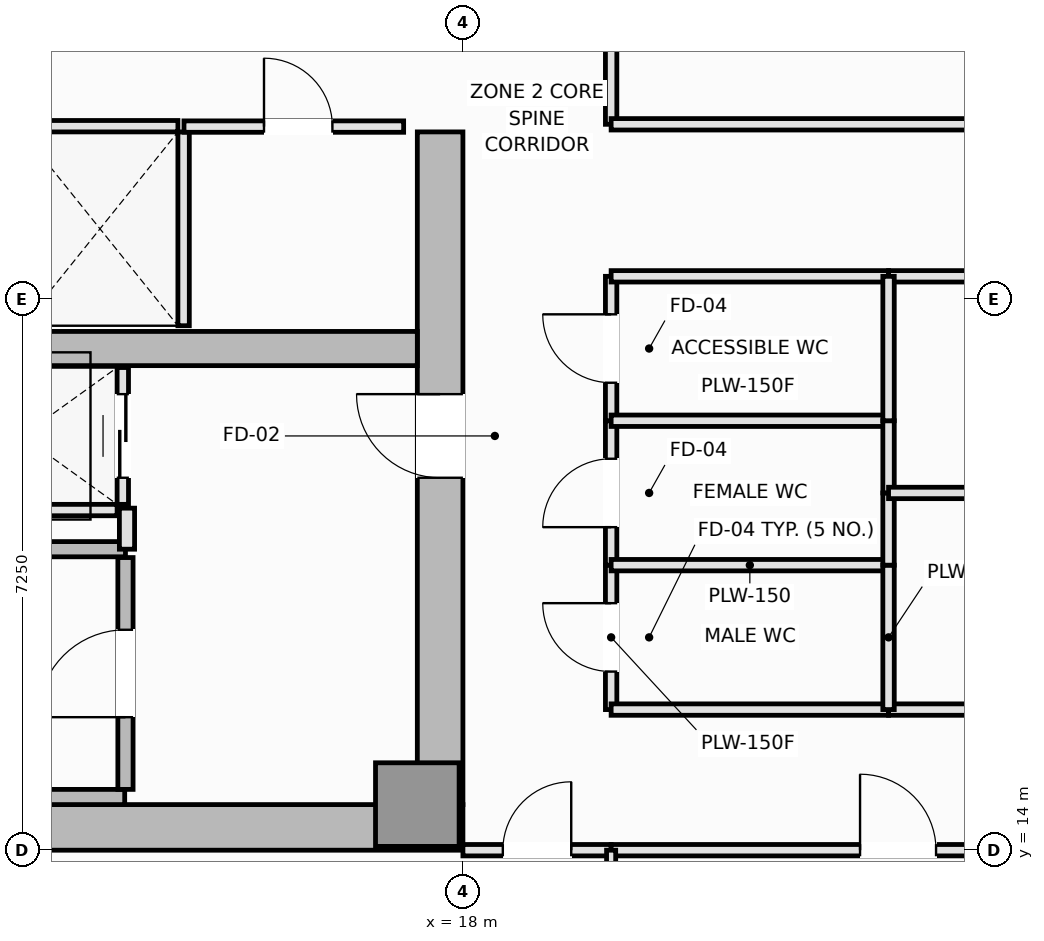
"""IFC4 building model, lengths in metres.
Left out: names, types, materials, properties, quantities, classifications, styles, units other than length and angle.
Written with IfcOpenShell. Run it as: python <this file> out.ifc"""

import sys

from ifc_helpers import new_model, si_unit, direction, frame, frame_2d, origin, origin_2d, place, context, subcontext, project, spatial, rectangle, extrude, element, fill, save


model = new_model("IFC4")
c1 = context("Model", 3, precision=1e-05, world=origin(), true_north=direction((0.0, 1.0)))
c2 = subcontext(c1, "Body", "Model", "MODEL_VIEW")
j1 = project(units=[si_unit("LENGTHUNIT", "METRE"), si_unit("PLANEANGLEUNIT", "RADIAN")], contexts=[c1])
p1 = place(None, origin())
s1 = spatial("IfcSite", under=j1, at=p1, CompositionType="ELEMENT")
p2 = place(p1, origin())
s2 = spatial("IfcBuilding", under=s1, at=p2, CompositionType="ELEMENT")
p3 = place(p2, frame((0.0, 0.0, 127.1)))
s3 = spatial("IfcBuildingStorey", under=s2, at=p3, CompositionType="ELEMENT", Elevation=127.1)
p4 = place(p3, frame((4.5, 14.3, 0.0), z_axis=(0.0, 0.0, 1.0), x_axis=(1.0, 0.0, 0.0)))
e1 = element("IfcWall", 1, at=p4, inside=s3, PredefinedType="SHEAR", context=c2, shape_type="SweptSolid", body=[
    extrude(rectangle(XDim=13.5, YDim=0.6, at=frame_2d((6.75, 0.0))), origin(), (0.0, 0.0, 1.0), 3.55),
])
p5 = place(p3, frame((17.7, 14.6, 0.0), z_axis=(0.0, 0.0, 1.0), x_axis=(0.0, 1.0, 0.0)))
e2 = element("IfcWall", 2, at=p5, inside=s3, PredefinedType="SHEAR", context=c2, shape_type="SweptSolid", body=[
    extrude(rectangle(XDim=8.85, YDim=0.6, at=frame_2d((4.425, 0.0))), origin(), (0.0, 0.0, 1.0), 3.55),
])
p6 = place(p5, frame((4.3, 0.0, 0.0)))
e3 = element("IfcOpeningElement", 3, at=p6, cuts=e2, PredefinedType="OPENING", context=c2, shape_type="SweptSolid", body=[
    extrude(rectangle(XDim=1.1, YDim=2.15, at=frame_2d((0.55, 1.075))), frame((0.0, 0.31, 0.0), z_axis=(0.0, -1.0, 0.0), x_axis=(1.0, 0.0, 0.0)), (0.0, 0.0, 1.0), 0.62),
])
p7 = place(p3, frame((5.1, 20.6, 0.0), z_axis=(0.0, 0.0, 1.0), x_axis=(1.0, 0.0, 0.0)))
e4 = element("IfcWall", 4, at=p7, inside=s3, PredefinedType="SHEAR", context=c2, shape_type="SweptSolid", body=[
    extrude(rectangle(XDim=12.3, YDim=0.45, at=frame_2d((6.15, 0.0))), origin(), (0.0, 0.0, 1.0), 3.55),
])
p8 = place(p3, frame((17.4, 14.6, 0.0), z_axis=(0.0, 0.0, 1.0), x_axis=(1.0, 0.0, 0.0)))
e5 = element("IfcColumn", 5, at=p8, inside=s3, PredefinedType="PILASTER", context=c2, shape_type="SweptSolid", body=[
    extrude(rectangle(XDim=1.1, YDim=1.1, at=origin_2d()), origin(), (0.0, 0.0, 1.0), 3.55),
])
p9 = place(p3, frame((5.8, 14.7, 0.0), z_axis=(0.0, 0.0, 1.0), x_axis=(1.0, 0.0, 0.0)))
e6 = element("IfcWall", 6, at=p9, inside=s3, PredefinedType="SOLIDWALL", context=c2, shape_type="SweptSolid", body=[
    extrude(rectangle(XDim=7.75, YDim=0.2, at=frame_2d((3.875, 0.0))), origin(), (0.0, 0.0, 1.0), 3.55),
])
p10 = place(p3, frame((5.9, 17.96, 0.0), z_axis=(0.0, 0.0, 1.0), x_axis=(1.0, 0.0, 0.0)))
e7 = element("IfcWall", 7, at=p10, inside=s3, PredefinedType="SOLIDWALL", context=c2, shape_type="SweptSolid", body=[
    extrude(rectangle(XDim=7.66, YDim=0.2, at=frame_2d((3.83, 0.0))), origin(), (0.0, 0.0, 1.0), 3.55),
])
p11 = place(p3, frame((13.56, 14.8, 0.0), z_axis=(0.0, 0.0, 1.0), x_axis=(0.0, 1.0, 0.0)))
e8 = element("IfcWall", 8, at=p11, inside=s3, PredefinedType="SOLIDWALL", context=c2, shape_type="SweptSolid", body=[
    extrude(rectangle(XDim=3.05, YDim=0.2, at=frame_2d((1.525, 0.0))), origin(), (0.0, 0.0, 1.0), 3.55),
])
p12 = place(p11, frame((0.95, 0.0, 0.0)))
e9 = element("IfcOpeningElement", 9, at=p12, cuts=e8, PredefinedType="OPENING", context=c2, shape_type="SweptSolid", body=[
    extrude(rectangle(XDim=1.15, YDim=2.15, at=frame_2d((0.575, 1.075))), frame((0.0, 0.11, 0.0), z_axis=(0.0, -1.0, 0.0), x_axis=(1.0, 0.0, 0.0)), (0.0, 0.0, 1.0), 0.22),
])
p13 = place(p3, frame((12.2, 23.525, 0.0), z_axis=(0.0, 0.0, 1.0), x_axis=(1.0, 0.0, 0.0)))
e10 = element("IfcWall", 10, at=p13, inside=s3, PredefinedType="PARTITIONING", context=c2, shape_type="SweptSolid", body=[
    extrude(rectangle(XDim=2.05, YDim=0.15, at=frame_2d((1.025, 0.0))), origin(), (0.0, 0.0, 1.0), 3.37),
])
p14 = place(p3, frame((14.325, 20.9, 0.0), z_axis=(0.0, 0.0, 1.0), x_axis=(0.0, 1.0, 0.0)))
e11 = element("IfcWall", 11, at=p14, inside=s3, PredefinedType="PARTITIONING", context=c2, shape_type="SweptSolid", body=[
    extrude(rectangle(XDim=2.55, YDim=0.15, at=frame_2d((1.275, 0.0))), origin(), (0.0, 0.0, 1.0), 3.37),
])
p15 = place(p3, frame((10.95, 18.475, 0.0), z_axis=(0.0, 0.0, 1.0), x_axis=(1.0, 0.0, 0.0)))
e12 = element("IfcWall", 12, at=p15, inside=s3, PredefinedType="PARTITIONING", context=c2, shape_type="SweptSolid", body=[
    extrude(rectangle(XDim=2.5, YDim=0.15, at=frame_2d((1.25, 0.0))), origin(), (0.0, 0.0, 1.0), 3.37),
])
p16 = place(p3, frame((13.525, 18.55, 0.0), z_axis=(0.0, 0.0, 1.0), x_axis=(0.0, 1.0, 0.0)))
e13 = element("IfcWall", 13, at=p16, inside=s3, PredefinedType="PARTITIONING", context=c2, shape_type="SweptSolid", body=[
    extrude(rectangle(XDim=1.8, YDim=0.15, at=frame_2d((0.9, 0.0))), origin(), (0.0, 0.0, 1.0), 3.37),
])
p17 = place(p16, frame((0.35, 0.0, 0.0)))
e14 = element("IfcOpeningElement", 14, at=p17, cuts=e13, PredefinedType="OPENING", context=c2, shape_type="SweptSolid", body=[
    extrude(rectangle(XDim=1.1, YDim=2.2, at=frame_2d((0.55, 1.1))), frame((0.0, 0.085, 0.0), z_axis=(0.0, -1.0, 0.0), x_axis=(1.0, 0.0, 0.0)), (0.0, 0.0, 1.0), 0.17),
])
p18 = place(p3, frame((13.58, 17.96, 0.0), z_axis=(0.0, 0.0, 1.0), x_axis=(0.0, 1.0, 0.0)))
e15 = element("IfcWall", 15, at=p18, inside=s3, PredefinedType="PARTITIONING", context=c2, shape_type="SweptSolid", body=[
    extrude(rectangle(XDim=0.54, YDim=0.2, at=frame_2d((0.27, 0.0))), origin(), (0.0, 0.0, 1.0), 3.37),
])
p19 = place(p3, frame((14.33, 23.52, 0.0), z_axis=(0.0, 0.0, 1.0), x_axis=(1.0, 0.0, 0.0)))
e16 = element("IfcWall", 16, at=p19, inside=s3, PredefinedType="PARTITIONING", context=c2, shape_type="SweptSolid", body=[
    extrude(rectangle(XDim=2.89, YDim=0.15, at=frame_2d((1.445, 0.0))), origin(), (0.0, 0.0, 1.0), 3.37),
])
p20 = place(p19, frame((1.053, 0.0, 0.0)))
e17 = element("IfcOpeningElement", 17, at=p20, cuts=e16, PredefinedType="OPENING", context=c2, shape_type="SweptSolid", body=[
    extrude(rectangle(XDim=0.9, YDim=2.1, at=frame_2d((0.45, 1.05))), frame((0.0, 0.085, 0.0), z_axis=(0.0, -1.0, 0.0), x_axis=(1.0, 0.0, 0.0)), (0.0, 0.0, 1.0), 0.17),
])
p21 = place(p3, frame((19.95, 15.85, 0.0), z_axis=(0.0, 0.0, 1.0), x_axis=(0.0, 1.0, 0.0)))
e18 = element("IfcWall", 18, at=p21, inside=s3, PredefinedType="PLUMBINGWALL", context=c2, shape_type="SweptSolid", body=[
    extrude(rectangle(XDim=1.9, YDim=0.15, at=frame_2d((0.95, 0.0))), origin(), (0.0, 0.0, 1.0), 3.37),
])
p22 = place(p21, frame((0.5, 0.0, 0.0)))
e19 = element("IfcOpeningElement", 19, at=p22, cuts=e18, PredefinedType="OPENING", context=c2, shape_type="SweptSolid", body=[
    extrude(rectangle(XDim=0.9, YDim=2.1, at=frame_2d((0.45, 1.05))), frame((0.0, 0.085, 0.0), z_axis=(0.0, -1.0, 0.0), x_axis=(1.0, 0.0, 0.0)), (0.0, 0.0, 1.0), 0.17),
])
p23 = place(p3, frame((19.95, 17.75, 0.0), z_axis=(0.0, 0.0, 1.0), x_axis=(0.0, 1.0, 0.0)))
e20 = element("IfcWall", 20, at=p23, inside=s3, PredefinedType="PLUMBINGWALL", context=c2, shape_type="SweptSolid", body=[
    extrude(rectangle(XDim=1.9, YDim=0.15, at=frame_2d((0.95, 0.0))), origin(), (0.0, 0.0, 1.0), 3.37),
])
p24 = place(p23, frame((0.5, 0.0, 0.0)))
e21 = element("IfcOpeningElement", 21, at=p24, cuts=e20, PredefinedType="OPENING", context=c2, shape_type="SweptSolid", body=[
    extrude(rectangle(XDim=0.9, YDim=2.1, at=frame_2d((0.45, 1.05))), frame((0.0, 0.085, 0.0), z_axis=(0.0, -1.0, 0.0), x_axis=(1.0, 0.0, 0.0)), (0.0, 0.0, 1.0), 0.17),
])
p25 = place(p3, frame((19.95, 19.65, 0.0), z_axis=(0.0, 0.0, 1.0), x_axis=(0.0, 1.0, 0.0)))
e22 = element("IfcWall", 22, at=p25, inside=s3, PredefinedType="PLUMBINGWALL", context=c2, shape_type="SweptSolid", body=[
    extrude(rectangle(XDim=1.9, YDim=0.15, at=frame_2d((0.95, 0.0))), origin(), (0.0, 0.0, 1.0), 3.37),
])
p26 = place(p25, frame((0.5, 0.0, 0.0)))
e23 = element("IfcOpeningElement", 23, at=p26, cuts=e22, PredefinedType="OPENING", context=c2, shape_type="SweptSolid", body=[
    extrude(rectangle(XDim=0.9, YDim=2.1, at=frame_2d((0.45, 1.05))), frame((0.0, 0.085, 0.0), z_axis=(0.0, -1.0, 0.0), x_axis=(1.0, 0.0, 0.0)), (0.0, 0.0, 1.0), 0.17),
])
p27 = place(p3, frame((19.95, 23.55, 0.0), z_axis=(0.0, 0.0, 1.0), x_axis=(0.0, 1.0, 0.0)))
e24 = element("IfcWall", 24, at=p27, inside=s3, PredefinedType="PARTITIONING", context=c2, shape_type="SweptSolid", body=[
    extrude(rectangle(XDim=6.25, YDim=0.15, at=frame_2d((3.125, 0.0))), origin(), (0.0, 0.0, 1.0), 3.37),
])
p28 = place(p27, frame((2.625, 0.0, 0.0)))
e25 = element("IfcOpeningElement", 25, at=p28, cuts=e24, PredefinedType="OPENING", context=c2, shape_type="SweptSolid", body=[
    extrude(rectangle(XDim=1.0, YDim=2.15, at=frame_2d((0.5, 1.075))), frame((0.0, 0.085, 0.0), z_axis=(0.0, -1.0, 0.0), x_axis=(1.0, 0.0, 0.0)), (0.0, 0.0, 1.0), 0.17),
])
p29 = place(p3, frame((18.0, 14.0, 0.0), z_axis=(0.0, 0.0, 1.0), x_axis=(1.0, 0.0, 0.0)))
e26 = element("IfcWall", 26, at=p29, inside=s3, PredefinedType="PARTITIONING", context=c2, shape_type="SweptSolid", body=[
    extrude(rectangle(XDim=1.95, YDim=0.15, at=frame_2d((0.975, 0.0))), origin(), (0.0, 0.0, 1.0), 3.37),
])
p30 = place(p29, frame((0.525, 0.0, 0.0)))
e27 = element("IfcOpeningElement", 27, at=p30, cuts=e26, PredefinedType="OPENING", context=c2, shape_type="SweptSolid", body=[
    extrude(rectangle(XDim=0.9, YDim=2.1, at=frame_2d((0.45, 1.05))), frame((0.0, 0.085, 0.0), z_axis=(0.0, -1.0, 0.0), x_axis=(1.0, 0.0, 0.0)), (0.0, 0.0, 1.0), 0.17),
])
p31 = place(p3, frame((19.95, 21.55, 0.0), z_axis=(0.0, 0.0, 1.0), x_axis=(1.0, 0.0, 0.0)))
e28 = element("IfcWall", 28, at=p31, inside=s3, PredefinedType="PLUMBINGWALL", context=c2, shape_type="SweptSolid", body=[
    extrude(rectangle(XDim=3.65, YDim=0.15, at=frame_2d((1.825, 0.0))), origin(), (0.0, 0.0, 1.0), 3.37),
])
p32 = place(p3, frame((23.6, 21.55, 0.0), z_axis=(0.0, 0.0, 1.0), x_axis=(1.0, 0.0, 0.0)))
e29 = element("IfcWall", 29, at=p32, inside=s3, PredefinedType="PARTITIONING", context=c2, shape_type="SweptSolid", body=[
    extrude(rectangle(XDim=3.9, YDim=0.15, at=frame_2d((1.95, 0.0))), origin(), (0.0, 0.0, 1.0), 3.37),
])
p33 = place(p32, frame((1.45, 0.0, 0.0)))
e30 = element("IfcOpeningElement", 30, at=p33, cuts=e29, PredefinedType="OPENING", context=c2, shape_type="SweptSolid", body=[
    extrude(rectangle(XDim=1.0, YDim=2.15, at=frame_2d((0.5, 1.075))), frame((0.0, 0.085, 0.0), z_axis=(0.0, -1.0, 0.0), x_axis=(1.0, 0.0, 0.0)), (0.0, 0.0, 1.0), 0.17),
])
p34 = place(p3, frame((19.95, 23.55, 0.0), z_axis=(0.0, 0.0, 1.0), x_axis=(1.0, 0.0, 0.0)))
e31 = element("IfcWall", 31, at=p34, inside=s3, PredefinedType="PARTITIONING", context=c2, shape_type="SweptSolid", body=[
    extrude(rectangle(XDim=7.55, YDim=0.15, at=frame_2d((3.775, 0.0))), origin(), (0.0, 0.0, 1.0), 3.37),
])
p35 = place(p3, frame((19.95, 15.85, 0.0), z_axis=(0.0, 0.0, 1.0), x_axis=(1.0, 0.0, 0.0)))
e32 = element("IfcWall", 32, at=p35, inside=s3, PredefinedType="PLUMBINGWALL", context=c2, shape_type="SweptSolid", body=[
    extrude(rectangle(XDim=3.65, YDim=0.15, at=frame_2d((1.825, 0.0))), origin(), (0.0, 0.0, 1.0), 3.37),
])
p36 = place(p3, frame((23.6, 15.85, 0.0), z_axis=(0.0, 0.0, 1.0), x_axis=(1.0, 0.0, 0.0)))
e33 = element("IfcWall", 33, at=p36, inside=s3, PredefinedType="PLUMBINGWALL", context=c2, shape_type="SweptSolid", body=[
    extrude(rectangle(XDim=3.9, YDim=0.15, at=frame_2d((1.95, 0.0))), origin(), (0.0, 0.0, 1.0), 3.37),
])
p37 = place(p36, frame((1.5, 0.0, 0.0)))
e34 = element("IfcOpeningElement", 34, at=p37, cuts=e33, PredefinedType="OPENING", context=c2, shape_type="SweptSolid", body=[
    extrude(rectangle(XDim=0.9, YDim=2.1, at=frame_2d((0.45, 1.05))), frame((0.0, 0.085, 0.0), z_axis=(0.0, -1.0, 0.0), x_axis=(1.0, 0.0, 0.0)), (0.0, 0.0, 1.0), 0.17),
])
p38 = place(p3, frame((19.95, 14.0, 0.0), z_axis=(0.0, 0.0, 1.0), x_axis=(1.0, 0.0, 0.0)))
e35 = element("IfcWall", 35, at=p38, inside=s3, PredefinedType="PARTITIONING", context=c2, shape_type="SweptSolid", body=[
    extrude(rectangle(XDim=7.55, YDim=0.15, at=frame_2d((3.775, 0.0))), origin(), (0.0, 0.0, 1.0), 3.37),
])
p39 = place(p38, frame((3.275, 0.0, 0.0)))
e36 = element("IfcOpeningElement", 36, at=p39, cuts=e35, PredefinedType="OPENING", context=c2, shape_type="SweptSolid", body=[
    extrude(rectangle(XDim=1.0, YDim=2.15, at=frame_2d((0.5, 1.075))), frame((0.0, 0.085, 0.0), z_axis=(0.0, -1.0, 0.0), x_axis=(1.0, 0.0, 0.0)), (0.0, 0.0, 1.0), 0.17),
])
p40 = place(p3, frame((19.95, 17.75, 0.0), z_axis=(0.0, 0.0, 1.0), x_axis=(1.0, 0.0, 0.0)))
e37 = element("IfcWall", 37, at=p40, inside=s3, PredefinedType="PLUMBINGWALL", context=c2, shape_type="SweptSolid", body=[
    extrude(rectangle(XDim=3.65, YDim=0.15, at=frame_2d((1.825, 0.0))), origin(), (0.0, 0.0, 1.0), 3.37),
])
p41 = place(p3, frame((23.6, 15.85, 0.0), z_axis=(0.0, 0.0, 1.0), x_axis=(0.0, 1.0, 0.0)))
e38 = element("IfcWall", 38, at=p41, inside=s3, PredefinedType="PLUMBINGWALL", context=c2, shape_type="SweptSolid", body=[
    extrude(rectangle(XDim=1.9, YDim=0.15, at=frame_2d((0.95, 0.0))), origin(), (0.0, 0.0, 1.0), 3.37),
])
p42 = place(p3, frame((19.95, 19.65, 0.0), z_axis=(0.0, 0.0, 1.0), x_axis=(1.0, 0.0, 0.0)))
e39 = element("IfcWall", 39, at=p42, inside=s3, PredefinedType="PLUMBINGWALL", context=c2, shape_type="SweptSolid", body=[
    extrude(rectangle(XDim=3.65, YDim=0.15, at=frame_2d((1.825, 0.0))), origin(), (0.0, 0.0, 1.0), 3.37),
])
for number, where, z_axis, x_axis in (
    (40, (23.6, 17.75, 0.0), (0.0, 0.0, 1.0), (0.0, 1.0, 0.0)),
    (41, (23.6, 18.7, 0.0), (0.0, 0.0, 1.0), (0.0, 1.0, 0.0)),
):
    element("IfcWall", number, at=place(p3, frame(where, z_axis=z_axis, x_axis=x_axis)), inside=s3, PredefinedType="PLUMBINGWALL", context=c2, shape_type="SweptSolid", body=[
        extrude(rectangle(XDim=0.95, YDim=0.15, at=frame_2d((0.475, 0.0))), origin(), (0.0, 0.0, 1.0), 3.37),
    ])
p43 = place(p3, frame((23.6, 19.65, 0.0), z_axis=(0.0, 0.0, 1.0), x_axis=(0.0, 1.0, 0.0)))
e42 = element("IfcWall", 42, at=p43, inside=s3, PredefinedType="PLUMBINGWALL", context=c2, shape_type="SweptSolid", body=[
    extrude(rectangle(XDim=1.9, YDim=0.15, at=frame_2d((0.95, 0.0))), origin(), (0.0, 0.0, 1.0), 3.37),
])
p44 = place(p3, frame((23.6, 18.7, 0.0), z_axis=(0.0, 0.0, 1.0), x_axis=(1.0, 0.0, 0.0)))
e43 = element("IfcWall", 43, at=p44, inside=s3, PredefinedType="PLUMBINGWALL", context=c2, shape_type="SweptSolid", body=[
    extrude(rectangle(XDim=3.9, YDim=0.15, at=frame_2d((1.95, 0.0))), origin(), (0.0, 0.0, 1.0), 3.37),
])
p45 = place(p3, frame((19.95, 3.51, 0.0), z_axis=(0.0, 0.0, 1.0), x_axis=(0.0, 1.0, 0.0)))
e44 = element("IfcWall", 44, at=p45, inside=s3, PredefinedType="PARTITIONING", context=c2, shape_type="SweptSolid", body=[
    extrude(rectangle(XDim=10.49, YDim=0.12, at=frame_2d((5.245, 0.0))), origin(), (0.0, 0.0, 1.0), 3.37),
])
p46 = place(p12, origin())
e45 = element("IfcDoor", 45, at=p46, inside=s3, OperationType="SINGLE_SWING_LEFT", PredefinedType="DOOR", context=c2, shape_type="SweptSolid", body=[
    extrude(rectangle(XDim=1.15, YDim=2.15, at=frame_2d((0.575, 1.075))), frame((0.0, 0.025, 0.0), z_axis=(0.0, -1.0, 0.0), x_axis=(1.0, 0.0, 0.0)), (0.0, 0.0, 1.0), 0.05),
])
fill(e9, e45)
p47 = place(p17, origin())
e46 = element("IfcDoor", 46, at=p47, inside=s3, OperationType="DOUBLE_DOOR_SLIDING", PredefinedType="DOOR", context=c2, shape_type="SweptSolid", body=[
    extrude(rectangle(XDim=1.1, YDim=2.2, at=frame_2d((0.55, 1.1))), frame((0.0, 0.025, 0.0), z_axis=(0.0, -1.0, 0.0), x_axis=(1.0, 0.0, 0.0)), (0.0, 0.0, 1.0), 0.05),
])
fill(e14, e46)
p48 = place(p6, origin())
e47 = element("IfcDoor", 47, at=p48, inside=s3, OperationType="SINGLE_SWING_RIGHT", PredefinedType="DOOR", context=c2, shape_type="SweptSolid", body=[
    extrude(rectangle(XDim=1.1, YDim=2.15, at=frame_2d((0.55, 1.075))), frame((0.0, 0.025, 0.0), z_axis=(0.0, -1.0, 0.0), x_axis=(1.0, 0.0, 0.0)), (0.0, 0.0, 1.0), 0.05),
])
fill(e3, e47)
p49 = place(p20, origin())
e48 = element("IfcDoor", 48, at=p49, inside=s3, OperationType="SINGLE_SWING_LEFT", PredefinedType="DOOR", context=c2, shape_type="SweptSolid", body=[
    extrude(rectangle(XDim=0.9, YDim=2.1, at=frame_2d((0.45, 1.05))), frame((0.0, 0.025, 0.0), z_axis=(0.0, -1.0, 0.0), x_axis=(1.0, 0.0, 0.0)), (0.0, 0.0, 1.0), 0.05),
])
fill(e17, e48)
p50 = place(p22, origin())
e49 = element("IfcDoor", 49, at=p50, inside=s3, OperationType="SINGLE_SWING_RIGHT", PredefinedType="DOOR", context=c2, shape_type="SweptSolid", body=[
    extrude(rectangle(XDim=0.9, YDim=2.1, at=frame_2d((0.45, 1.05))), frame((0.0, 0.025, 0.0), z_axis=(0.0, -1.0, 0.0), x_axis=(1.0, 0.0, 0.0)), (0.0, 0.0, 1.0), 0.05),
])
fill(e19, e49)
p51 = place(p24, origin())
e50 = element("IfcDoor", 50, at=p51, inside=s3, OperationType="SINGLE_SWING_LEFT", PredefinedType="DOOR", context=c2, shape_type="SweptSolid", body=[
    extrude(rectangle(XDim=0.9, YDim=2.1, at=frame_2d((0.45, 1.05))), frame((0.0, 0.025, 0.0), z_axis=(0.0, -1.0, 0.0), x_axis=(1.0, 0.0, 0.0)), (0.0, 0.0, 1.0), 0.05),
])
fill(e21, e50)
p52 = place(p26, origin())
e51 = element("IfcDoor", 51, at=p52, inside=s3, OperationType="SINGLE_SWING_RIGHT", PredefinedType="DOOR", context=c2, shape_type="SweptSolid", body=[
    extrude(rectangle(XDim=0.9, YDim=2.1, at=frame_2d((0.45, 1.05))), frame((0.0, 0.025, 0.0), z_axis=(0.0, -1.0, 0.0), x_axis=(1.0, 0.0, 0.0)), (0.0, 0.0, 1.0), 0.05),
])
fill(e23, e51)
p53 = place(p30, origin())
e52 = element("IfcDoor", 52, at=p53, inside=s3, OperationType="SINGLE_SWING_RIGHT", PredefinedType="DOOR", context=c2, shape_type="SweptSolid", body=[
    extrude(rectangle(XDim=0.9, YDim=2.1, at=frame_2d((0.45, 1.05))), frame((0.0, 0.025, 0.0), z_axis=(0.0, -1.0, 0.0), x_axis=(1.0, 0.0, 0.0)), (0.0, 0.0, 1.0), 0.05),
])
fill(e27, e52)
p54 = place(p39, origin())
e53 = element("IfcDoor", 53, at=p54, inside=s3, OperationType="SINGLE_SWING_LEFT", PredefinedType="DOOR", context=c2, shape_type="SweptSolid", body=[
    extrude(rectangle(XDim=1.0, YDim=2.15, at=frame_2d((0.5, 1.075))), frame((0.0, 0.025, 0.0), z_axis=(0.0, -1.0, 0.0), x_axis=(1.0, 0.0, 0.0)), (0.0, 0.0, 1.0), 0.05),
])
fill(e36, e53)
save(model, sys.argv[1])
